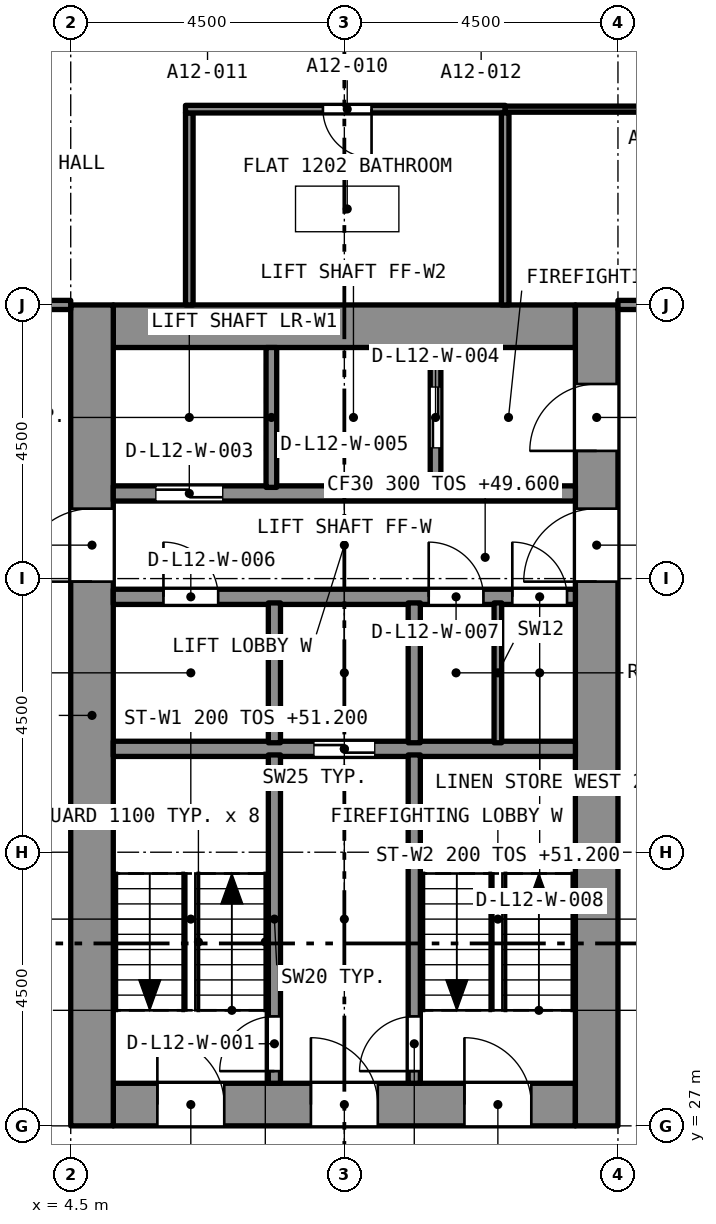
"""IFC4 building model, lengths in metres.
Left out: names, types, materials, properties, quantities, classifications, styles, units other than length and angle.
Written with IfcOpenShell. Run it as: python <this file> out.ifc"""

import sys

from ifc_helpers import new_model, si_unit, direction, frame, frame_2d, origin, place, context, subcontext, project, spatial, rectangle, extrude, element, fill, save


model = new_model("IFC4")
c1 = context("Model", 3, precision=1e-05, world=origin(), true_north=direction((0.0, 1.0)))
c2 = subcontext(c1, "Body", "Model", "MODEL_VIEW")
j1 = project(units=[si_unit("LENGTHUNIT", "METRE"), si_unit("PLANEANGLEUNIT", "RADIAN")], contexts=[c1])
p1 = place(None, origin())
s1 = spatial("IfcSite", under=j1, at=p1, CompositionType="ELEMENT")
p2 = place(p1, origin())
s2 = spatial("IfcBuilding", under=s1, at=p2, CompositionType="ELEMENT")
p3 = place(p2, frame((0.0, 0.0, 49.6)))
s3 = spatial("IfcBuildingStorey", under=s2, at=p3, CompositionType="ELEMENT", Elevation=49.6)
p4 = place(p3, frame((5.2, 27.35, 0.0), z_axis=(0.0, 0.0, 1.0), x_axis=(1.0, 0.0, 0.0)))
e1 = element("IfcWall", 1, at=p4, inside=s3, PredefinedType="SOLIDWALL", context=c2, shape_type="SweptSolid", body=[
    extrude(rectangle(XDim=7.6, YDim=0.7, at=frame_2d((3.8, 0.0))), origin(), (0.0, 0.0, 1.0), 3.2),
])
p5 = place(p4, frame((0.725, 0.0, 0.0)))
e2 = element("IfcOpeningElement", 2, at=p5, cuts=e1, PredefinedType="OPENING", context=c2, shape_type="SweptSolid", body=[
    extrude(rectangle(XDim=1.1, YDim=2.1, at=frame_2d((0.55, 1.05))), frame((0.0, 0.36, 0.0), z_axis=(0.0, -1.0, 0.0), x_axis=(1.0, 0.0, 0.0)), (0.0, 0.0, 1.0), 0.72),
])
p6 = place(p4, frame((3.25, 0.0, 0.0)))
e3 = element("IfcOpeningElement", 3, at=p6, cuts=e1, PredefinedType="OPENING", context=c2, shape_type="SweptSolid", body=[
    extrude(rectangle(XDim=1.1, YDim=2.1, at=frame_2d((0.55, 1.05))), frame((0.0, 0.36, 0.0), z_axis=(0.0, -1.0, 0.0), x_axis=(1.0, 0.0, 0.0)), (0.0, 0.0, 1.0), 0.72),
])
p7 = place(p4, frame((5.775, 0.0, 0.0)))
e4 = element("IfcOpeningElement", 4, at=p7, cuts=e1, PredefinedType="OPENING", context=c2, shape_type="SweptSolid", body=[
    extrude(rectangle(XDim=1.1, YDim=2.1, at=frame_2d((0.55, 1.05))), frame((0.0, 0.36, 0.0), z_axis=(0.0, -1.0, 0.0), x_axis=(1.0, 0.0, 0.0)), (0.0, 0.0, 1.0), 0.72),
])
p8 = place(p3, frame((5.2, 40.15, 0.0), z_axis=(0.0, 0.0, 1.0), x_axis=(1.0, 0.0, 0.0)))
e5 = element("IfcWall", 5, at=p8, inside=s3, PredefinedType="SOLIDWALL", context=c2, shape_type="SweptSolid", body=[
    extrude(rectangle(XDim=7.6, YDim=0.7, at=frame_2d((3.8, 0.0))), origin(), (0.0, 0.0, 1.0), 3.2),
])
p9 = place(p3, frame((4.85, 27.0, 0.0), z_axis=(0.0, 0.0, 1.0), x_axis=(0.0, 1.0, 0.0)))
e6 = element("IfcWall", 6, at=p9, inside=s3, PredefinedType="SOLIDWALL", context=c2, shape_type="SweptSolid", body=[
    extrude(rectangle(XDim=13.5, YDim=0.7, at=frame_2d((6.75, 0.0))), origin(), (0.0, 0.0, 1.0), 3.2),
])
p10 = place(p9, frame((8.95, 0.0, 0.0)))
e7 = element("IfcOpeningElement", 7, at=p10, cuts=e6, PredefinedType="OPENING", context=c2, shape_type="SweptSolid", body=[
    extrude(rectangle(XDim=1.2, YDim=2.1, at=frame_2d((0.6, 1.05))), frame((0.0, 0.36, 0.0), z_axis=(0.0, -1.0, 0.0), x_axis=(1.0, 0.0, 0.0)), (0.0, 0.0, 1.0), 0.72),
])
p11 = place(p3, frame((13.15, 27.0, 0.0), z_axis=(0.0, 0.0, 1.0), x_axis=(0.0, 1.0, 0.0)))
e8 = element("IfcWall", 8, at=p11, inside=s3, PredefinedType="SOLIDWALL", context=c2, shape_type="SweptSolid", body=[
    extrude(rectangle(XDim=13.5, YDim=0.7, at=frame_2d((6.75, 0.0))), origin(), (0.0, 0.0, 1.0), 3.2),
])
p12 = place(p11, frame((11.1, 0.0, 0.0)))
e9 = element("IfcOpeningElement", 9, at=p12, cuts=e8, PredefinedType="OPENING", context=c2, shape_type="SweptSolid", body=[
    extrude(rectangle(XDim=1.1, YDim=2.1, at=frame_2d((0.55, 1.05))), frame((0.0, 0.36, 0.0), z_axis=(0.0, -1.0, 0.0), x_axis=(1.0, 0.0, 0.0)), (0.0, 0.0, 1.0), 0.72),
])
p13 = place(p11, frame((8.95, 0.0, 0.0)))
e10 = element("IfcOpeningElement", 10, at=p13, cuts=e8, PredefinedType="OPENING", context=c2, shape_type="SweptSolid", body=[
    extrude(rectangle(XDim=1.2, YDim=2.1, at=frame_2d((0.6, 1.05))), frame((0.0, 0.36, 0.0), z_axis=(0.0, -1.0, 0.0), x_axis=(1.0, 0.0, 0.0)), (0.0, 0.0, 1.0), 0.72),
])
p14 = place(p3, frame((6.45, 40.5, 0.0), z_axis=(0.0, 0.0, 1.0), x_axis=(0.0, 1.0, 0.0)))
e11 = element("IfcWall", 11, at=p14, inside=s3, PredefinedType="PARTITIONING", context=c2, shape_type="SweptSolid", body=[
    extrude(rectangle(XDim=3.157, YDim=0.125, at=frame_2d((1.579, 0.0))), origin(), (0.0, 0.0, 1.0), 2.9),
])
p15 = place(p3, frame((11.645, 43.72, 0.0), z_axis=(0.0, 0.0, 1.0), x_axis=(-1.0, 0.0, 0.0)))
e12 = element("IfcWall", 12, at=p15, inside=s3, PredefinedType="PARTITIONING", context=c2, shape_type="SweptSolid", body=[
    extrude(rectangle(XDim=5.258, YDim=0.125, at=frame_2d((2.629, 0.0))), origin(), (0.0, 0.0, 1.0), 2.9),
])
p16 = place(p15, frame((2.198, 0.0, 0.0)))
e13 = element("IfcOpeningElement", 13, at=p16, cuts=e12, PredefinedType="OPENING", context=c2, shape_type="SweptSolid", body=[
    extrude(rectangle(XDim=0.8, YDim=2.1, at=frame_2d((0.4, 1.05))), frame((0.0, 0.073, 0.0), z_axis=(0.0, -1.0, 0.0), x_axis=(1.0, 0.0, 0.0)), (0.0, 0.0, 1.0), 0.145),
])
p17 = place(p3, frame((11.645, 40.5, 0.0), z_axis=(0.0, 0.0, 1.0), x_axis=(0.0, 1.0, 0.0)))
e14 = element("IfcWall", 14, at=p17, inside=s3, PredefinedType="PARTITIONING", context=c2, shape_type="SweptSolid", body=[
    extrude(rectangle(XDim=3.157, YDim=0.125, at=frame_2d((1.579, 0.0))), origin(), (0.0, 0.0, 1.0), 2.9),
])
p18 = place(p3, frame((17.9, 43.72, 0.0), z_axis=(0.0, 0.0, 1.0), x_axis=(-1.0, 0.0, 0.0)))
e15 = element("IfcWall", 15, at=p18, inside=s3, PredefinedType="PARTITIONING", context=c2, shape_type="SweptSolid", body=[
    extrude(rectangle(XDim=6.255, YDim=0.1, at=frame_2d((3.127, 0.0))), origin(), (0.0, 0.0, 1.0), 2.9),
])
p19 = place(p18, frame((2.627, 0.0, 0.0)))
e16 = element("IfcOpeningElement", 16, at=p19, cuts=e15, PredefinedType="OPENING", context=c2, shape_type="SweptSolid", body=[
    extrude(rectangle(XDim=0.9, YDim=2.1, at=frame_2d((0.45, 1.05))), frame((0.0, 0.06, 0.0), z_axis=(0.0, -1.0, 0.0), x_axis=(1.0, 0.0, 0.0)), (0.0, 0.0, 1.0), 0.12),
])
p20 = place(p3, frame((0.7, 40.5, 0.0), z_axis=(0.0, 0.0, 1.0), x_axis=(1.0, 0.0, 0.0)))
e17 = element("IfcWall", 17, at=p20, inside=s3, PredefinedType="PARTITIONING", context=c2, shape_type="SweptSolid", body=[
    extrude(rectangle(XDim=3.8, YDim=0.15, at=frame_2d((1.9, 0.0))), origin(), (0.0, 0.0, 1.0), 2.9),
])
p21 = place(p20, frame((1.05, 0.0, 0.0)))
e18 = element("IfcOpeningElement", 18, at=p21, cuts=e17, PredefinedType="OPENING", context=c2, shape_type="SweptSolid", body=[
    extrude(rectangle(XDim=1.0, YDim=2.1, at=frame_2d((0.5, 1.05))), frame((0.0, 0.085, 0.0), z_axis=(0.0, -1.0, 0.0), x_axis=(1.0, 0.0, 0.0)), (0.0, 0.0, 1.0), 0.17),
])
p22 = place(p3, frame((13.5, 40.5, 0.0), z_axis=(0.0, 0.0, 1.0), x_axis=(1.0, 0.0, 0.0)))
e19 = element("IfcWall", 19, at=p22, inside=s3, PredefinedType="PARTITIONING", context=c2, shape_type="SweptSolid", body=[
    extrude(rectangle(XDim=3.8, YDim=0.15, at=frame_2d((1.9, 0.0))), origin(), (0.0, 0.0, 1.0), 2.9),
])
p23 = place(p3, frame((5.2, 33.2, 0.0), z_axis=(0.0, 0.0, 1.0), x_axis=(1.0, 0.0, 0.0)))
e20 = element("IfcWall", 20, at=p23, inside=s3, PredefinedType="SOLIDWALL", context=c2, shape_type="SweptSolid", body=[
    extrude(rectangle(XDim=7.6, YDim=0.25, at=frame_2d((3.8, 0.0))), origin(), (0.0, 0.0, 1.0), 2.9),
])
p24 = place(p23, frame((3.3, 0.0, 0.0)))
e21 = element("IfcOpeningElement", 21, at=p24, cuts=e20, PredefinedType="OPENING", context=c2, shape_type="SweptSolid", body=[
    extrude(rectangle(XDim=1.0, YDim=2.1, at=frame_2d((0.5, 1.05))), frame((0.0, 0.135, 0.0), z_axis=(0.0, -1.0, 0.0), x_axis=(1.0, 0.0, 0.0)), (0.0, 0.0, 1.0), 0.27),
])
p25 = place(p3, frame((5.2, 35.7, 0.0), z_axis=(0.0, 0.0, 1.0), x_axis=(1.0, 0.0, 0.0)))
e22 = element("IfcWall", 22, at=p25, inside=s3, PredefinedType="SOLIDWALL", context=c2, shape_type="SweptSolid", body=[
    extrude(rectangle(XDim=7.6, YDim=0.25, at=frame_2d((3.8, 0.0))), origin(), (0.0, 0.0, 1.0), 2.9),
])
p26 = place(p25, frame((0.825, 0.0, 0.0)))
e23 = element("IfcOpeningElement", 23, at=p26, cuts=e22, PredefinedType="OPENING", context=c2, shape_type="SweptSolid", body=[
    extrude(rectangle(XDim=0.9, YDim=2.1, at=frame_2d((0.45, 1.05))), frame((0.0, 0.135, 0.0), z_axis=(0.0, -1.0, 0.0), x_axis=(1.0, 0.0, 0.0)), (0.0, 0.0, 1.0), 0.27),
])
p27 = place(p25, frame((5.188, 0.0, 0.0)))
e24 = element("IfcOpeningElement", 24, at=p27, cuts=e22, PredefinedType="OPENING", context=c2, shape_type="SweptSolid", body=[
    extrude(rectangle(XDim=0.9, YDim=2.1, at=frame_2d((0.45, 1.05))), frame((0.0, 0.135, 0.0), z_axis=(0.0, -1.0, 0.0), x_axis=(1.0, 0.0, 0.0)), (0.0, 0.0, 1.0), 0.27),
])
p28 = place(p25, frame((6.562, 0.0, 0.0)))
e25 = element("IfcOpeningElement", 25, at=p28, cuts=e22, PredefinedType="OPENING", context=c2, shape_type="SweptSolid", body=[
    extrude(rectangle(XDim=0.9, YDim=2.1, at=frame_2d((0.45, 1.05))), frame((0.0, 0.135, 0.0), z_axis=(0.0, -1.0, 0.0), x_axis=(1.0, 0.0, 0.0)), (0.0, 0.0, 1.0), 0.27),
])
p29 = place(p3, frame((5.2, 37.4, 0.0), z_axis=(0.0, 0.0, 1.0), x_axis=(1.0, 0.0, 0.0)))
e26 = element("IfcWall", 26, at=p29, inside=s3, PredefinedType="SOLIDWALL", context=c2, shape_type="SweptSolid", body=[
    extrude(rectangle(XDim=7.6, YDim=0.25, at=frame_2d((3.8, 0.0))), origin(), (0.0, 0.0, 1.0), 2.9),
])
p30 = place(p29, frame((0.7, 0.0, 0.0)))
e27 = element("IfcOpeningElement", 27, at=p30, cuts=e26, PredefinedType="OPENING", context=c2, shape_type="SweptSolid", body=[
    extrude(rectangle(XDim=1.1, YDim=2.4, at=frame_2d((0.55, 1.2))), frame((0.0, 0.135, 0.0), z_axis=(0.0, -1.0, 0.0), x_axis=(1.0, 0.0, 0.0)), (0.0, 0.0, 1.0), 0.27),
])
p31 = place(p3, frame((7.85, 27.7, 0.0), z_axis=(0.0, 0.0, 1.0), x_axis=(0.0, 1.0, 0.0)))
e28 = element("IfcWall", 28, at=p31, inside=s3, PredefinedType="SOLIDWALL", context=c2, shape_type="SweptSolid", body=[
    extrude(rectangle(XDim=5.4, YDim=0.2, at=frame_2d((2.7, 0.0))), origin(), (0.0, 0.0, 1.0), 2.9),
])
p32 = place(p31, frame((0.2, 0.0, 0.0)))
e29 = element("IfcOpeningElement", 29, at=p32, cuts=e28, PredefinedType="OPENING", context=c2, shape_type="SweptSolid", body=[
    extrude(rectangle(XDim=0.9, YDim=2.1, at=frame_2d((0.45, 1.05))), frame((0.0, 0.11, 0.0), z_axis=(0.0, -1.0, 0.0), x_axis=(1.0, 0.0, 0.0)), (0.0, 0.0, 1.0), 0.22),
])
p33 = place(p3, frame((10.15, 27.7, 0.0), z_axis=(0.0, 0.0, 1.0), x_axis=(0.0, 1.0, 0.0)))
e30 = element("IfcWall", 30, at=p33, inside=s3, PredefinedType="SOLIDWALL", context=c2, shape_type="SweptSolid", body=[
    extrude(rectangle(XDim=5.4, YDim=0.2, at=frame_2d((2.7, 0.0))), origin(), (0.0, 0.0, 1.0), 2.9),
])
p34 = place(p33, frame((0.2, 0.0, 0.0)))
e31 = element("IfcOpeningElement", 31, at=p34, cuts=e30, PredefinedType="OPENING", context=c2, shape_type="SweptSolid", body=[
    extrude(rectangle(XDim=0.9, YDim=2.1, at=frame_2d((0.45, 1.05))), frame((0.0, 0.11, 0.0), z_axis=(0.0, -1.0, 0.0), x_axis=(1.0, 0.0, 0.0)), (0.0, 0.0, 1.0), 0.22),
])
for number, where, z_axis, x_axis in (
    (32, (7.85, 33.3, 0.0), (0.0, 0.0, 1.0), (0.0, 1.0, 0.0)),
    (33, (10.15, 33.3, 0.0), (0.0, 0.0, 1.0), (0.0, 1.0, 0.0)),
):
    element("IfcWall", number, at=place(p3, frame(where, z_axis=z_axis, x_axis=x_axis)), inside=s3, PredefinedType="SOLIDWALL", context=c2, shape_type="SweptSolid", body=[
        extrude(rectangle(XDim=2.3, YDim=0.2, at=frame_2d((1.15, 0.0))), origin(), (0.0, 0.0, 1.0), 2.9),
    ])
p35 = place(p3, frame((7.8, 37.5, 0.0), z_axis=(0.0, 0.0, 1.0), x_axis=(0.0, 1.0, 0.0)))
e34 = element("IfcWall", 34, at=p35, inside=s3, PredefinedType="SOLIDWALL", context=c2, shape_type="SweptSolid", body=[
    extrude(rectangle(XDim=2.3, YDim=0.175, at=frame_2d((1.15, 0.0))), origin(), (0.0, 0.0, 1.0), 2.9),
])
p36 = place(p3, frame((10.5, 37.5, 0.0), z_axis=(0.0, 0.0, 1.0), x_axis=(0.0, 1.0, 0.0)))
e35 = element("IfcWall", 35, at=p36, inside=s3, PredefinedType="SOLIDWALL", context=c2, shape_type="SweptSolid", body=[
    extrude(rectangle(XDim=2.3, YDim=0.175, at=frame_2d((1.15, 0.0))), origin(), (0.0, 0.0, 1.0), 2.9),
])
p37 = place(p36, frame((0.65, 0.0, 0.0)))
e36 = element("IfcOpeningElement", 36, at=p37, cuts=e35, PredefinedType="OPENING", context=c2, shape_type="SweptSolid", body=[
    extrude(rectangle(XDim=1.0, YDim=2.1, at=frame_2d((0.5, 1.05))), frame((0.0, 0.097, 0.0), z_axis=(0.0, -1.0, 0.0), x_axis=(1.0, 0.0, 0.0)), (0.0, 0.0, 1.0), 0.195),
])
p38 = place(p3, frame((11.525, 33.3, 0.0), z_axis=(0.0, 0.0, 1.0), x_axis=(0.0, 1.0, 0.0)))
e37 = element("IfcWall", 37, at=p38, inside=s3, PredefinedType="PARTITIONING", context=c2, shape_type="SweptSolid", body=[
    extrude(rectangle(XDim=2.3, YDim=0.125, at=frame_2d((1.15, 0.0))), origin(), (0.0, 0.0, 1.0), 2.9),
])
p39 = place(p16, origin())
e38 = element("IfcDoor", 38, at=p39, inside=s3, OperationType="SINGLE_SWING_LEFT", PredefinedType="DOOR", context=c2, shape_type="SweptSolid", body=[
    extrude(rectangle(XDim=0.8, YDim=2.1, at=frame_2d((0.4, 1.05))), frame((0.0, 0.025, 0.0), z_axis=(0.0, -1.0, 0.0), x_axis=(1.0, 0.0, 0.0)), (0.0, 0.0, 1.0), 0.05),
])
fill(e13, e38)
p40 = place(p32, origin())
e39 = element("IfcDoor", 39, at=p40, inside=s3, OperationType="SINGLE_SWING_LEFT", PredefinedType="DOOR", context=c2, shape_type="SweptSolid", body=[
    extrude(rectangle(XDim=0.9, YDim=2.1, at=frame_2d((0.45, 1.05))), frame((0.0, 0.025, 0.0), z_axis=(0.0, -1.0, 0.0), x_axis=(1.0, 0.0, 0.0)), (0.0, 0.0, 1.0), 0.05),
])
fill(e29, e39)
p41 = place(p34, origin())
e40 = element("IfcDoor", 40, at=p41, inside=s3, OperationType="SINGLE_SWING_LEFT", PredefinedType="DOOR", context=c2, shape_type="SweptSolid", body=[
    extrude(rectangle(XDim=0.9, YDim=2.1, at=frame_2d((0.45, 1.05))), frame((0.0, 0.025, 0.0), z_axis=(0.0, -1.0, 0.0), x_axis=(1.0, 0.0, 0.0)), (0.0, 0.0, 1.0), 0.05),
])
fill(e31, e40)
p42 = place(p30, origin())
e41 = element("IfcDoor", 41, at=p42, inside=s3, OperationType="SLIDING_TO_LEFT", PredefinedType="DOOR", context=c2, shape_type="SweptSolid", body=[
    extrude(rectangle(XDim=1.1, YDim=2.4, at=frame_2d((0.55, 1.2))), frame((0.0, 0.025, 0.0), z_axis=(0.0, -1.0, 0.0), x_axis=(1.0, 0.0, 0.0)), (0.0, 0.0, 1.0), 0.05),
])
fill(e27, e41)
p43 = place(p37, origin())
e42 = element("IfcDoor", 42, at=p43, inside=s3, OperationType="SLIDING_TO_LEFT", PredefinedType="DOOR", context=c2, shape_type="SweptSolid", body=[
    extrude(rectangle(XDim=1.0, YDim=2.1, at=frame_2d((0.5, 1.05))), frame((0.0, 0.025, 0.0), z_axis=(0.0, -1.0, 0.0), x_axis=(1.0, 0.0, 0.0)), (0.0, 0.0, 1.0), 0.05),
])
fill(e36, e42)
p44 = place(p24, origin())
e43 = element("IfcDoor", 43, at=p44, inside=s3, OperationType="SLIDING_TO_LEFT", PredefinedType="DOOR", context=c2, shape_type="SweptSolid", body=[
    extrude(rectangle(XDim=1.0, YDim=2.1, at=frame_2d((0.5, 1.05))), frame((0.0, 0.025, 0.0), z_axis=(0.0, -1.0, 0.0), x_axis=(1.0, 0.0, 0.0)), (0.0, 0.0, 1.0), 0.05),
])
fill(e21, e43)
p45 = place(p26, origin())
e44 = element("IfcDoor", 44, at=p45, inside=s3, OperationType="SINGLE_SWING_LEFT", PredefinedType="DOOR", context=c2, shape_type="SweptSolid", body=[
    extrude(rectangle(XDim=0.9, YDim=2.1, at=frame_2d((0.45, 1.05))), frame((0.0, 0.025, 0.0), z_axis=(0.0, -1.0, 0.0), x_axis=(1.0, 0.0, 0.0)), (0.0, 0.0, 1.0), 0.05),
])
fill(e23, e44)
p46 = place(p27, origin())
e45 = element("IfcDoor", 45, at=p46, inside=s3, OperationType="SINGLE_SWING_LEFT", PredefinedType="DOOR", context=c2, shape_type="SweptSolid", body=[
    extrude(rectangle(XDim=0.9, YDim=2.1, at=frame_2d((0.45, 1.05))), frame((0.0, 0.025, 0.0), z_axis=(0.0, -1.0, 0.0), x_axis=(1.0, 0.0, 0.0)), (0.0, 0.0, 1.0), 0.05),
])
fill(e24, e45)
p47 = place(p28, origin())
e46 = element("IfcDoor", 46, at=p47, inside=s3, OperationType="SINGLE_SWING_LEFT", PredefinedType="DOOR", context=c2, shape_type="SweptSolid", body=[
    extrude(rectangle(XDim=0.9, YDim=2.1, at=frame_2d((0.45, 1.05))), frame((0.0, 0.025, 0.0), z_axis=(0.0, -1.0, 0.0), x_axis=(1.0, 0.0, 0.0)), (0.0, 0.0, 1.0), 0.05),
])
fill(e25, e46)
p48 = place(p5, origin())
e47 = element("IfcDoor", 47, at=p48, inside=s3, OperationType="SINGLE_SWING_LEFT", PredefinedType="DOOR", context=c2, shape_type="SweptSolid", body=[
    extrude(rectangle(XDim=1.1, YDim=2.1, at=frame_2d((0.55, 1.05))), frame((0.0, 0.025, 0.0), z_axis=(0.0, -1.0, 0.0), x_axis=(1.0, 0.0, 0.0)), (0.0, 0.0, 1.0), 0.05),
])
fill(e2, e47)
p49 = place(p6, origin())
e48 = element("IfcDoor", 48, at=p49, inside=s3, OperationType="SINGLE_SWING_LEFT", PredefinedType="DOOR", context=c2, shape_type="SweptSolid", body=[
    extrude(rectangle(XDim=1.1, YDim=2.1, at=frame_2d((0.55, 1.05))), frame((0.0, 0.025, 0.0), z_axis=(0.0, -1.0, 0.0), x_axis=(1.0, 0.0, 0.0)), (0.0, 0.0, 1.0), 0.05),
])
fill(e3, e48)
p50 = place(p7, origin())
e49 = element("IfcDoor", 49, at=p50, inside=s3, OperationType="SINGLE_SWING_LEFT", PredefinedType="DOOR", context=c2, shape_type="SweptSolid", body=[
    extrude(rectangle(XDim=1.1, YDim=2.1, at=frame_2d((0.55, 1.05))), frame((0.0, 0.025, 0.0), z_axis=(0.0, -1.0, 0.0), x_axis=(1.0, 0.0, 0.0)), (0.0, 0.0, 1.0), 0.05),
])
fill(e4, e49)
p51 = place(p12, origin())
e50 = element("IfcDoor", 50, at=p51, inside=s3, OperationType="SINGLE_SWING_LEFT", PredefinedType="DOOR", context=c2, shape_type="SweptSolid", body=[
    extrude(rectangle(XDim=1.1, YDim=2.1, at=frame_2d((0.55, 1.05))), frame((0.0, 0.025, 0.0), z_axis=(0.0, -1.0, 0.0), x_axis=(1.0, 0.0, 0.0)), (0.0, 0.0, 1.0), 0.05),
])
fill(e9, e50)
p52 = place(p10, origin())
e51 = element("IfcDoor", 51, at=p52, inside=s3, OperationType="SINGLE_SWING_LEFT", PredefinedType="DOOR", context=c2, shape_type="SweptSolid", body=[
    extrude(rectangle(XDim=1.2, YDim=2.1, at=frame_2d((0.6, 1.05))), frame((0.0, 0.025, 0.0), z_axis=(0.0, -1.0, 0.0), x_axis=(1.0, 0.0, 0.0)), (0.0, 0.0, 1.0), 0.05),
])
fill(e7, e51)
p53 = place(p13, origin())
e52 = element("IfcDoor", 52, at=p53, inside=s3, OperationType="SINGLE_SWING_LEFT", PredefinedType="DOOR", context=c2, shape_type="SweptSolid", body=[
    extrude(rectangle(XDim=1.2, YDim=2.1, at=frame_2d((0.6, 1.05))), frame((0.0, 0.025, 0.0), z_axis=(0.0, -1.0, 0.0), x_axis=(1.0, 0.0, 0.0)), (0.0, 0.0, 1.0), 0.05),
])
fill(e10, e52)
save(model, sys.argv[1])
